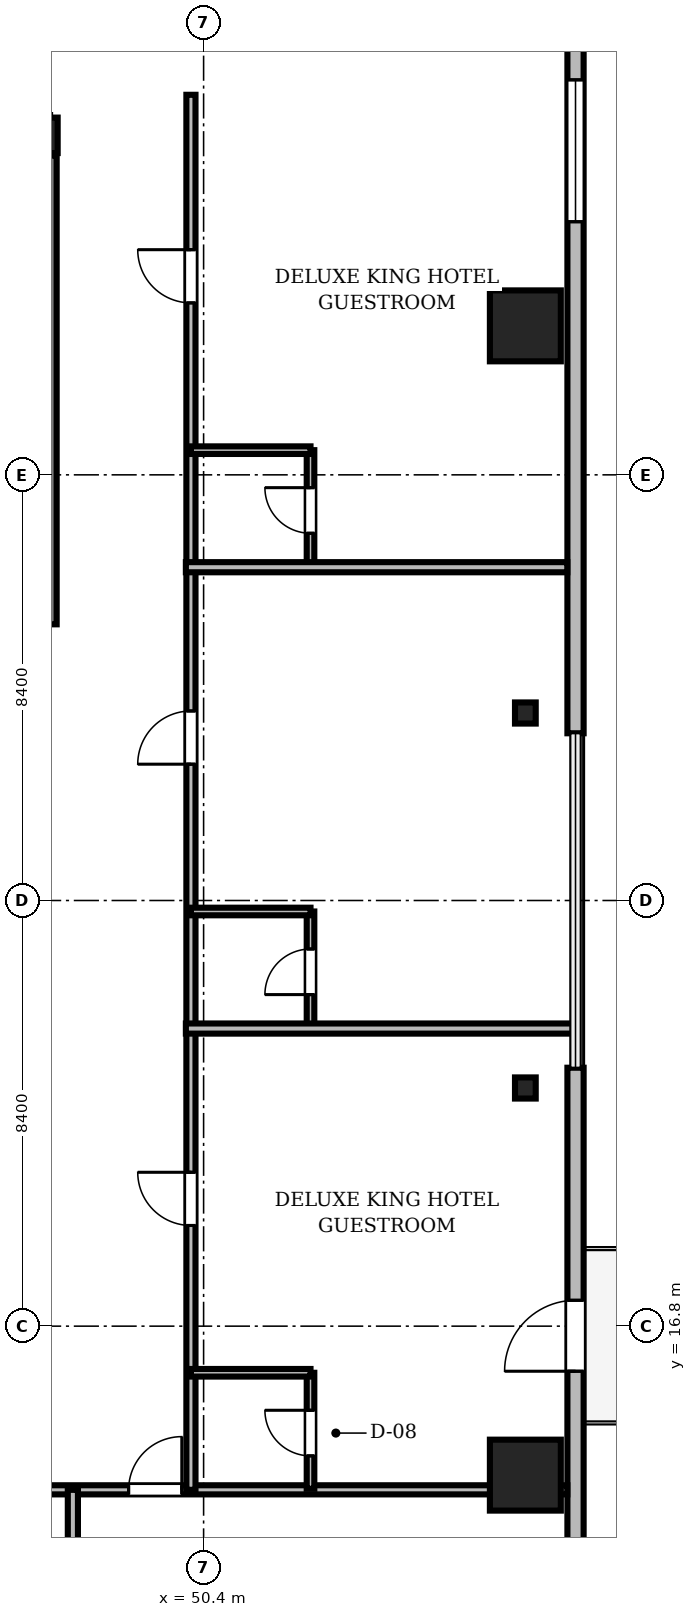
"""IFC4 building model, lengths in metres.
Left out: names, types, materials, properties, quantities, classifications, styles, units other than length and angle.
Written with IfcOpenShell. Run it as: python <this file> out.ifc"""

import sys

from ifc_helpers import new_model, si_unit, direction, frame, frame_2d, origin, origin_2d, place, context, subcontext, project, spatial, rectangle, i_section, extrude, source, transform, mapped, element, fill, save


model = new_model("IFC4")
c1 = context("Model", 3, precision=1e-05, world=origin(), true_north=direction((0.0, 1.0)))
c2 = subcontext(c1, "Body", "Model", "MODEL_VIEW")
j1 = project(units=[si_unit("LENGTHUNIT", "METRE"), si_unit("PLANEANGLEUNIT", "RADIAN")], contexts=[c1])
p1 = place(None, origin())
s1 = spatial("IfcSite", under=j1, at=p1, CompositionType="ELEMENT")
p2 = place(p1, origin())
s2 = spatial("IfcBuilding", under=s1, at=p2, CompositionType="ELEMENT")
p3 = place(p2, frame((0.0, 0.0, 233.55)))
s3 = spatial("IfcBuildingStorey", under=s2, at=p3, CompositionType="ELEMENT", Elevation=233.55)
m1 = source(origin(), c2, "Body", "SweptSolid", [
    extrude(i_section(OverallWidth=0.3, OverallDepth=0.7, WebThickness=0.017, FlangeThickness=0.032, FilletRadius=0.027, at=origin_2d()), origin(), (0.0, 0.0, 1.0), 3.1),
])
p4 = place(p3, frame((47.37, 40.3, 0.0), z_axis=(0.0, 0.0, 1.0), x_axis=(1.0, 0.0, 0.0)))
e1 = element("IfcColumn", 1, at=p4, inside=s3, PredefinedType="COLUMN", context=c2, shape_type="MappedRepresentation", body=[
    mapped(m1, transform((0.0, 0.0, 0.0), scale=1.0)),
])
m2 = source(origin(), c2, "Body", "SweptSolid", [
    extrude(rectangle(XDim=1.4, YDim=1.4, at=origin_2d()), origin(), (0.0, 0.0, 1.0), 3.1),
])
for number, where, z_axis, x_axis in (
    (2, (56.75, 13.86, 0.0), (0.0, 0.0, 1.0), (1.0, 0.0, 0.0)),
    (3, (56.75, 36.54, 0.0), (0.0, 0.0, 1.0), (1.0, 0.0, 0.0)),
):
    element("IfcColumn", number, at=place(p3, frame(where, z_axis=z_axis, x_axis=x_axis)), inside=s3, PredefinedType="COLUMN", context=c2, shape_type="MappedRepresentation", body=[
        mapped(m2, transform((0.0, 0.0, 0.0), scale=1.0)),
    ])
m3 = source(origin(), c2, "Body", "SweptSolid", [
    extrude(i_section(OverallWidth=0.409, OverallDepth=0.417, WebThickness=0.021, FlangeThickness=0.033, FilletRadius=0.015, at=origin_2d()), origin(), (0.0, 0.0, 1.0), 3.1),
])
for number, where, z_axis, x_axis in (
    (4, (56.75, 21.5, 0.0), (0.0, 0.0, 1.0), (1.0, 0.0, 0.0)),
    (5, (56.75, 28.9, 0.0), (0.0, 0.0, 1.0), (1.0, 0.0, 0.0)),
):
    element("IfcColumn", number, at=place(p3, frame(where, z_axis=z_axis, x_axis=x_axis)), inside=s3, PredefinedType="COLUMN", context=c2, shape_type="MappedRepresentation", body=[
        mapped(m3, transform((0.0, 0.0, 0.0), scale=1.0)),
    ])
m4 = source(origin(), c2, "Body", "SweptSolid", [
    extrude(rectangle(XDim=15.6, YDim=0.32, at=frame_2d((7.8, 0.0))), origin(), (0.0, 0.0, 1.0), 3.1),
])
p5 = place(p3, frame((57.74, 6.3, 0.0), z_axis=(0.0, 0.0, 1.0), x_axis=(0.0, 1.0, 0.0)))
e6 = element("IfcWall", 6, at=p5, inside=s3, PredefinedType="SOLIDWALL", context=c2, shape_type="MappedRepresentation", body=[
    mapped(m4, transform((0.0, 0.0, 0.0), scale=1.0)),
])
m5 = source(origin(), c2, "Body", "SweptSolid", [
    extrude(rectangle(XDim=1.4, YDim=2.3, at=frame_2d((0.7, 1.15))), frame((0.0, 0.17, 0.0), z_axis=(0.0, -1.0, 0.0), x_axis=(1.0, 0.0, 0.0)), (0.0, 0.0, 1.0), 0.34),
])
p6 = place(p5, frame((9.61, 0.0, 0.0)))
e7 = element("IfcOpeningElement", 7, at=p6, cuts=e6, PredefinedType="OPENING", context=c2, shape_type="MappedRepresentation", body=[
    mapped(m5, transform((0.0, 0.0, 0.0), scale=1.0)),
])
m6 = source(origin(), c2, "Body", "SweptSolid", [
    extrude(rectangle(XDim=2.8, YDim=2.4, at=frame_2d((1.4, 1.2))), frame((0.0, 0.17, 0.0), z_axis=(0.0, -1.0, 0.0), x_axis=(1.0, 0.0, 0.0)), (0.0, 0.0, 1.0), 0.34),
])
p7 = place(p5, frame((2.705, 0.0, 0.44)))
e8 = element("IfcOpeningElement", 8, at=p7, cuts=e6, PredefinedType="OPENING", context=c2, shape_type="MappedRepresentation", body=[
    mapped(m6, transform((0.0, 0.0, 0.0), scale=1.0)),
])
m7 = source(origin(), c2, "Body", "SweptSolid", [
    extrude(rectangle(XDim=15.6, YDim=0.32, at=frame_2d((7.8, 0.0))), origin(), (0.0, 0.0, 1.0), 3.1),
])
p8 = place(p3, frame((57.74, 28.5, 0.0), z_axis=(0.0, 0.0, 1.0), x_axis=(0.0, 1.0, 0.0)))
e9 = element("IfcWall", 9, at=p8, inside=s3, PredefinedType="SOLIDWALL", context=c2, shape_type="MappedRepresentation", body=[
    mapped(m7, transform((0.0, 0.0, 0.0), scale=1.0)),
])
p9 = place(p8, frame((10.095, 0.0, 0.44)))
e10 = element("IfcOpeningElement", 10, at=p9, cuts=e9, PredefinedType="OPENING", context=c2, shape_type="MappedRepresentation", body=[
    mapped(m6, transform((0.0, 0.0, 0.0), scale=1.0)),
])
m8 = source(origin(), c2, "Body", "SweptSolid", [
    extrude(rectangle(XDim=9.25, YDim=0.25, at=frame_2d((4.625, 0.0))), origin(), (0.0, 0.0, 1.0), 3.55),
])
p10 = place(p3, frame((47.375, 30.65, 0.0), z_axis=(0.0, 0.0, 1.0), x_axis=(0.0, 1.0, 0.0)))
e11 = element("IfcWall", 11, at=p10, inside=s3, PredefinedType="SOLIDWALL", context=c2, shape_type="MappedRepresentation", body=[
    mapped(m8, transform((0.0, 0.0, 0.0), scale=1.0)),
])
m9 = source(origin(), c2, "Body", "SweptSolid", [
    extrude(rectangle(XDim=46.156, YDim=0.18, at=frame_2d((23.078, 0.0))), origin(), (0.0, 0.0, 1.0), 2.376),
])
p11 = place(p3, frame((11.422, 13.57, 0.0), z_axis=(0.0, 0.0, 1.0), x_axis=(1.0, 0.0, 0.0)))
e12 = element("IfcWall", 12, at=p11, inside=s3, PredefinedType="PARTITIONING", context=c2, shape_type="MappedRepresentation", body=[
    mapped(m9, transform((0.0, 0.0, 0.0), scale=1.0)),
])
m10 = source(origin(), c2, "Body", "SweptSolid", [
    extrude(rectangle(XDim=1.05, YDim=2.2, at=frame_2d((0.525, 1.1))), frame((0.0, 0.1, 0.0), z_axis=(0.0, -1.0, 0.0), x_axis=(1.0, 0.0, 0.0)), (0.0, 0.0, 1.0), 0.2),
])
p12 = place(p11, frame((14.338, 0.0, 0.0)))
e13 = element("IfcOpeningElement", 13, at=p12, cuts=e12, PredefinedType="OPENING", context=c2, shape_type="MappedRepresentation", body=[
    mapped(m10, transform((0.0, 0.0, 0.0), scale=1.0)),
])
p13 = place(p11, frame((17.059, 0.0, 0.0)))
e14 = element("IfcOpeningElement", 14, at=p13, cuts=e12, PredefinedType="OPENING", context=c2, shape_type="MappedRepresentation", body=[
    mapped(m10, transform((0.0, 0.0, 0.0), scale=1.0)),
])
p14 = place(p11, frame((21.772, 0.0, 0.0)))
e15 = element("IfcOpeningElement", 15, at=p14, cuts=e12, PredefinedType="OPENING", context=c2, shape_type="MappedRepresentation", body=[
    mapped(m10, transform((0.0, 0.0, 0.0), scale=1.0)),
])
p15 = place(p11, frame((27.414, 0.0, 0.0)))
e16 = element("IfcOpeningElement", 16, at=p15, cuts=e12, PredefinedType="OPENING", context=c2, shape_type="MappedRepresentation", body=[
    mapped(m10, transform((0.0, 0.0, 0.0), scale=1.0)),
])
p16 = place(p11, frame((33.057, 0.0, 0.0)))
e17 = element("IfcOpeningElement", 17, at=p16, cuts=e12, PredefinedType="OPENING", context=c2, shape_type="MappedRepresentation", body=[
    mapped(m10, transform((0.0, 0.0, 0.0), scale=1.0)),
])
p17 = place(p11, frame((37.498, 0.0, 0.0)))
e18 = element("IfcOpeningElement", 18, at=p17, cuts=e12, PredefinedType="OPENING", context=c2, shape_type="MappedRepresentation", body=[
    mapped(m10, transform((0.0, 0.0, 0.0), scale=1.0)),
])
m11 = source(origin(), c2, "Body", "SweptSolid", [
    extrude(rectangle(XDim=27.53, YDim=0.18, at=frame_2d((13.765, 0.0))), origin(), (0.0, 0.0, 1.0), 2.542),
])
p18 = place(p3, frame((50.15, 13.57, 0.0), z_axis=(0.0, 0.0, 1.0), x_axis=(0.0, 1.0, 0.0)))
e19 = element("IfcWall", 19, at=p18, inside=s3, PredefinedType="PARTITIONING", context=c2, shape_type="MappedRepresentation", body=[
    mapped(m11, transform((0.0, 0.0, 0.0), scale=1.0)),
])
p19 = place(p18, frame((5.217, 0.0, 0.0)))
e20 = element("IfcOpeningElement", 20, at=p19, cuts=e19, PredefinedType="OPENING", context=c2, shape_type="MappedRepresentation", body=[
    mapped(m10, transform((0.0, 0.0, 0.0), scale=1.0)),
])
p20 = place(p18, frame((14.32, 0.0, 0.0)))
e21 = element("IfcOpeningElement", 21, at=p20, cuts=e19, PredefinedType="OPENING", context=c2, shape_type="MappedRepresentation", body=[
    mapped(m10, transform((0.0, 0.0, 0.0), scale=1.0)),
])
p21 = place(p18, frame((23.423, 0.0, 0.0)))
e22 = element("IfcOpeningElement", 22, at=p21, cuts=e19, PredefinedType="OPENING", context=c2, shape_type="MappedRepresentation", body=[
    mapped(m10, transform((0.0, 0.0, 0.0), scale=1.0)),
])
m12 = source(origin(), c2, "Body", "SweptSolid", [
    extrude(rectangle(XDim=2.29, YDim=0.15, at=frame_2d((1.145, 0.0))), origin(), (0.0, 0.0, 1.0), 2.542),
])
p22 = place(p3, frame((52.51, 13.59, 0.0), z_axis=(0.0, 0.0, 1.0), x_axis=(0.0, 1.0, 0.0)))
e23 = element("IfcWall", 23, at=p22, inside=s3, PredefinedType="PARTITIONING", context=c2, shape_type="MappedRepresentation", body=[
    mapped(m12, transform((0.0, 0.0, 0.0), scale=1.0)),
])
m13 = source(origin(), c2, "Body", "SweptSolid", [
    extrude(rectangle(XDim=0.9, YDim=2.1, at=frame_2d((0.45, 1.05))), frame((0.0, 0.085, 0.0), z_axis=(0.0, -1.0, 0.0), x_axis=(1.0, 0.0, 0.0)), (0.0, 0.0, 1.0), 0.17),
])
p23 = place(p22, frame((0.65, 0.0, 0.0)))
e24 = element("IfcOpeningElement", 24, at=p23, cuts=e23, PredefinedType="OPENING", context=c2, shape_type="MappedRepresentation", body=[
    mapped(m13, transform((0.0, 0.0, 0.0), scale=1.0)),
])
m14 = source(origin(), c2, "Body", "SweptSolid", [
    extrude(rectangle(XDim=2.29, YDim=0.15, at=frame_2d((1.145, 0.0))), origin(), (0.0, 0.0, 1.0), 2.792),
])
p24 = place(p3, frame((52.51, 22.693, 0.0), z_axis=(0.0, 0.0, 1.0), x_axis=(0.0, 1.0, 0.0)))
e25 = element("IfcWall", 25, at=p24, inside=s3, PredefinedType="PARTITIONING", context=c2, shape_type="MappedRepresentation", body=[
    mapped(m14, transform((0.0, 0.0, 0.0), scale=1.0)),
])
p25 = place(p24, frame((0.65, 0.0, 0.0)))
e26 = element("IfcOpeningElement", 26, at=p25, cuts=e25, PredefinedType="OPENING", context=c2, shape_type="MappedRepresentation", body=[
    mapped(m13, transform((0.0, 0.0, 0.0), scale=1.0)),
])
m15 = source(origin(), c2, "Body", "SweptSolid", [
    extrude(rectangle(XDim=2.29, YDim=0.15, at=frame_2d((1.145, 0.0))), origin(), (0.0, 0.0, 1.0), 3.1),
])
p26 = place(p3, frame((52.51, 31.797, 0.0), z_axis=(0.0, 0.0, 1.0), x_axis=(0.0, 1.0, 0.0)))
e27 = element("IfcWall", 27, at=p26, inside=s3, PredefinedType="PARTITIONING", context=c2, shape_type="MappedRepresentation", body=[
    mapped(m15, transform((0.0, 0.0, 0.0), scale=1.0)),
])
p27 = place(p26, frame((0.65, 0.0, 0.0)))
e28 = element("IfcOpeningElement", 28, at=p27, cuts=e27, PredefinedType="OPENING", context=c2, shape_type="MappedRepresentation", body=[
    mapped(m13, transform((0.0, 0.0, 0.0), scale=1.0)),
])
m16 = source(origin(), c2, "Body", "SweptSolid", [
    extrude(rectangle(XDim=11.448, YDim=0.2, at=frame_2d((5.724, 0.0))), origin(), (0.0, 0.0, 1.0), 2.376),
])
p28 = place(p3, frame((47.82, 2.122, 0.0), z_axis=(0.0, 0.0, 1.0), x_axis=(0.0, 1.0, 0.0)))
e29 = element("IfcWall", 29, at=p28, inside=s3, PredefinedType="PARTITIONING", context=c2, shape_type="MappedRepresentation", body=[
    mapped(m16, transform((0.0, 0.0, 0.0), scale=1.0)),
])
m17 = source(origin(), c2, "Body", "SweptSolid", [
    extrude(rectangle(XDim=7.72, YDim=0.2, at=frame_2d((3.86, 0.0))), origin(), (0.0, 0.0, 1.0), 2.376),
])
p29 = place(p3, frame((50.05, 22.673, 0.0), z_axis=(0.0, 0.0, 1.0), x_axis=(1.0, 0.0, 0.0)))
e30 = element("IfcWall", 30, at=p29, inside=s3, PredefinedType="PARTITIONING", context=c2, shape_type="MappedRepresentation", body=[
    mapped(m17, transform((0.0, 0.0, 0.0), scale=1.0)),
])
m18 = source(origin(), c2, "Body", "SweptSolid", [
    extrude(rectangle(XDim=7.528, YDim=0.2, at=frame_2d((3.764, 0.0))), origin(), (0.0, 0.0, 1.0), 2.376),
])
p30 = place(p3, frame((50.05, 31.777, 0.0), z_axis=(0.0, 0.0, 1.0), x_axis=(1.0, 0.0, 0.0)))
e31 = element("IfcWall", 31, at=p30, inside=s3, PredefinedType="PARTITIONING", context=c2, shape_type="MappedRepresentation", body=[
    mapped(m18, transform((0.0, 0.0, 0.0), scale=1.0)),
])
m19 = source(origin(), c2, "Body", "SweptSolid", [
    extrude(rectangle(XDim=2.36, YDim=0.15, at=frame_2d((1.18, 0.0))), origin(), (0.0, 0.0, 1.0), 3.1),
])
for number, where, z_axis, x_axis in (
    (32, (50.15, 15.88, 0.0), (0.0, 0.0, 1.0), (1.0, 0.0, 0.0)),
    (33, (50.15, 24.983, 0.0), (0.0, 0.0, 1.0), (1.0, 0.0, 0.0)),
    (34, (50.15, 34.087, 0.0), (0.0, 0.0, 1.0), (1.0, 0.0, 0.0)),
):
    element("IfcWall", number, at=place(p3, frame(where, z_axis=z_axis, x_axis=x_axis)), inside=s3, PredefinedType="PARTITIONING", context=c2, shape_type="MappedRepresentation", body=[
        mapped(m19, transform((0.0, 0.0, 0.0), scale=1.0)),
    ])
m20 = source(origin(), c2, "Body", "SweptSolid", [
    extrude(rectangle(XDim=1.4, YDim=2.3, at=frame_2d((0.7, 1.15))), frame((0.0, 0.025, 0.0), z_axis=(0.0, -1.0, 0.0), x_axis=(1.0, 0.0, 0.0)), (0.0, 0.0, 1.0), 0.05),
])
p31 = place(p6, frame((1.4, 0.0, 0.0), z_axis=(0.0, 0.0, 1.0), x_axis=(-1.0, 0.0, 0.0)))
e35 = element("IfcDoor", 35, at=p31, inside=s3, OperationType="DOUBLE_DOOR_SLIDING", PredefinedType="DOOR", context=c2, shape_type="MappedRepresentation", body=[
    mapped(m20, transform((0.0, 0.0, 0.0), scale=1.0)),
])
fill(e7, e35)
m21 = source(origin(), c2, "Body", "SweptSolid", [
    extrude(rectangle(XDim=2.8, YDim=2.4, at=frame_2d((1.4, 1.2))), frame((0.0, 0.03, 0.0), z_axis=(0.0, -1.0, 0.0), x_axis=(1.0, 0.0, 0.0)), (0.0, 0.0, 1.0), 0.06),
])
p32 = place(p9, origin())
e36 = element("IfcWindow", 36, at=p32, inside=s3, PartitioningType="SINGLE_PANEL", PredefinedType="WINDOW", context=c2, shape_type="MappedRepresentation", body=[
    mapped(m21, transform((0.0, 0.0, 0.0), scale=1.0)),
])
fill(e10, e36)
m22 = source(origin(), c2, "Body", "SweptSolid", [
    extrude(rectangle(XDim=1.05, YDim=2.2, at=frame_2d((0.525, 1.1))), frame((0.0, 0.025, 0.0), z_axis=(0.0, -1.0, 0.0), x_axis=(1.0, 0.0, 0.0)), (0.0, 0.0, 1.0), 0.05),
])
p33 = place(p17, origin())
e37 = element("IfcDoor", 37, at=p33, inside=s3, OperationType="SINGLE_SWING_RIGHT", PredefinedType="DOOR", context=c2, shape_type="MappedRepresentation", body=[
    mapped(m22, transform((0.0, 0.0, 0.0), scale=1.0)),
])
fill(e18, e37)
p34 = place(p19, origin())
e38 = element("IfcDoor", 38, at=p34, inside=s3, OperationType="SINGLE_SWING_RIGHT", PredefinedType="DOOR", context=c2, shape_type="MappedRepresentation", body=[
    mapped(m22, transform((0.0, 0.0, 0.0), scale=1.0)),
])
fill(e20, e38)
p35 = place(p20, origin())
e39 = element("IfcDoor", 39, at=p35, inside=s3, OperationType="SINGLE_SWING_LEFT", PredefinedType="DOOR", context=c2, shape_type="MappedRepresentation", body=[
    mapped(m22, transform((0.0, 0.0, 0.0), scale=1.0)),
])
fill(e21, e39)
p36 = place(p21, origin())
e40 = element("IfcDoor", 40, at=p36, inside=s3, OperationType="SINGLE_SWING_RIGHT", PredefinedType="DOOR", context=c2, shape_type="MappedRepresentation", body=[
    mapped(m22, transform((0.0, 0.0, 0.0), scale=1.0)),
])
fill(e22, e40)
m23 = source(origin(), c2, "Body", "SweptSolid", [
    extrude(rectangle(XDim=0.9, YDim=2.1, at=frame_2d((0.45, 1.05))), frame((0.0, 0.025, 0.0), z_axis=(0.0, -1.0, 0.0), x_axis=(1.0, 0.0, 0.0)), (0.0, 0.0, 1.0), 0.05),
])
p37 = place(p23, origin())
e41 = element("IfcDoor", 41, at=p37, inside=s3, OperationType="SINGLE_SWING_RIGHT", PredefinedType="DOOR", context=c2, shape_type="MappedRepresentation", body=[
    mapped(m23, transform((0.0, 0.0, 0.0), scale=1.0)),
])
fill(e24, e41)
p38 = place(p25, origin())
e42 = element("IfcDoor", 42, at=p38, inside=s3, OperationType="SINGLE_SWING_LEFT", PredefinedType="DOOR", context=c2, shape_type="MappedRepresentation", body=[
    mapped(m23, transform((0.0, 0.0, 0.0), scale=1.0)),
])
fill(e26, e42)
p39 = place(p27, origin())
e43 = element("IfcDoor", 43, at=p39, inside=s3, OperationType="SINGLE_SWING_RIGHT", PredefinedType="DOOR", context=c2, shape_type="MappedRepresentation", body=[
    mapped(m23, transform((0.0, 0.0, 0.0), scale=1.0)),
])
fill(e28, e43)
save(model, sys.argv[1])
